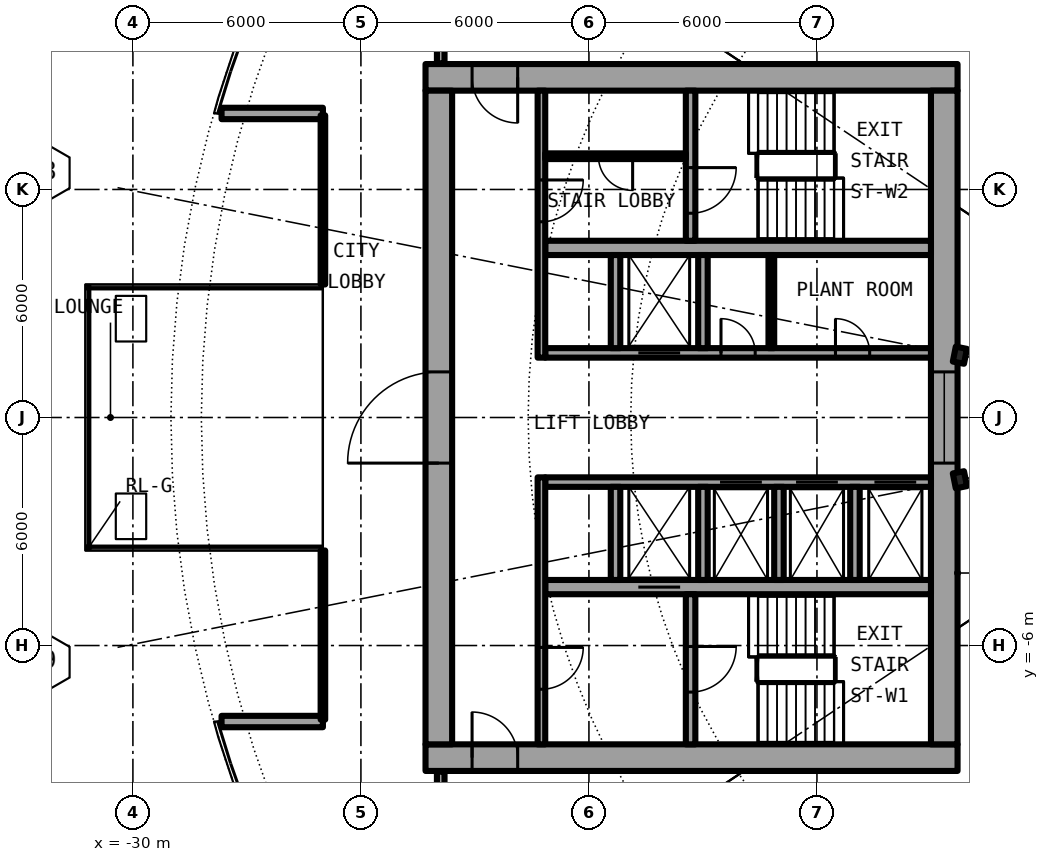
"""IFC4 building model, lengths in metres.
Left out: names, types, materials, properties, quantities, classifications, styles, units other than length and angle.
Written with IfcOpenShell. Run it as: python <this file> out.ifc"""

import sys

from ifc_helpers import new_model, si_unit, direction, frame, frame_2d, origin, origin_2d, place, context, subcontext, project, spatial, rectangle, i_section, extrude, element, fill, save


model = new_model("IFC4")
c1 = context("Model", 3, precision=1e-05, world=origin(), true_north=direction((0.0, 1.0)))
c2 = subcontext(c1, "Body", "Model", "MODEL_VIEW")
j1 = project(units=[si_unit("LENGTHUNIT", "METRE"), si_unit("PLANEANGLEUNIT", "RADIAN")], contexts=[c1])
p1 = place(None, origin())
s1 = spatial("IfcSite", under=j1, at=p1, CompositionType="ELEMENT")
p2 = place(p1, origin())
s2 = spatial("IfcBuilding", under=s1, at=p2, CompositionType="ELEMENT")
p3 = place(p2, frame((0.0, 0.0, 97.15)))
s3 = spatial("IfcBuildingStorey", under=s2, at=p3, CompositionType="ELEMENT", Elevation=97.15)
for number, where, z_axis, x_axis in (
    (1, (-8.239, 1.639, 0.0), (0.0, 0.0, 1.0), (-0.981, 0.195, 0.0)),
    (2, (-8.239, -1.639, 0.0), (0.0, 0.0, 1.0), (-0.981, -0.195, 0.0)),
):
    element("IfcColumn", number, at=place(p3, frame(where, z_axis=z_axis, x_axis=x_axis)), inside=s3, PredefinedType="COLUMN", context=c2, shape_type="SweptSolid", body=[
        extrude(i_section(OverallWidth=0.3, OverallDepth=0.4, WebThickness=0.013, FlangeThickness=0.024, FilletRadius=0.027, at=origin_2d()), origin(), (0.0, 0.0, 1.0), 6.1),
    ])
for number, where, z_axis, x_axis in (
    (3, (-25.0, 8.0, 0.0), (0.0, 0.0, 1.0), (-1.0, 0.0, 0.0)),
    (4, (-25.0, -8.0, 0.0), (0.0, 0.0, 1.0), (-1.0, 0.0, 0.0)),
):
    element("IfcWall", number, at=place(p3, frame(where, z_axis=z_axis, x_axis=x_axis)), inside=s3, PredefinedType="SOLIDWALL", context=c2, shape_type="SweptSolid", body=[
        extrude(rectangle(XDim=2.667, YDim=0.3, at=frame_2d((1.333, 0.0))), origin(), (0.0, 0.0, 1.0), 5.7),
    ])
p4 = place(p3, frame((-22.3, -8.95, 0.0), z_axis=(0.0, 0.0, 1.0), x_axis=(1.0, 0.0, 0.0)))
e5 = element("IfcWall", 5, at=p4, inside=s3, PredefinedType="SHEAR", context=c2, shape_type="SweptSolid", body=[
    extrude(rectangle(XDim=14.0, YDim=0.7, at=frame_2d((7.0, 0.0))), origin(), (0.0, 0.0, 1.0), 6.1),
])
p5 = place(p4, frame((1.225, 0.0, 0.0)))
e6 = element("IfcOpeningElement", 6, at=p5, cuts=e5, PredefinedType="OPENING", context=c2, shape_type="SweptSolid", body=[
    extrude(rectangle(XDim=1.2, YDim=2.3, at=frame_2d((0.6, 1.15))), frame((0.0, 0.36, 0.0), z_axis=(0.0, -1.0, 0.0), x_axis=(1.0, 0.0, 0.0)), (0.0, 0.0, 1.0), 0.72),
])
p6 = place(p3, frame((-8.3, 8.95, 0.0), z_axis=(0.0, 0.0, 1.0), x_axis=(-1.0, 0.0, 0.0)))
e7 = element("IfcWall", 7, at=p6, inside=s3, PredefinedType="SHEAR", context=c2, shape_type="SweptSolid", body=[
    extrude(rectangle(XDim=14.0, YDim=0.7, at=frame_2d((7.0, 0.0))), origin(), (0.0, 0.0, 1.0), 6.1),
])
p7 = place(p6, frame((11.575, 0.0, 0.0)))
e8 = element("IfcOpeningElement", 8, at=p7, cuts=e7, PredefinedType="OPENING", context=c2, shape_type="SweptSolid", body=[
    extrude(rectangle(XDim=1.2, YDim=2.3, at=frame_2d((0.6, 1.15))), frame((0.0, 0.36, 0.0), z_axis=(0.0, -1.0, 0.0), x_axis=(1.0, 0.0, 0.0)), (0.0, 0.0, 1.0), 0.72),
])
p8 = place(p3, frame((-21.95, -8.6, 0.0), z_axis=(0.0, 0.0, 1.0), x_axis=(0.0, 1.0, 0.0)))
e9 = element("IfcWall", 9, at=p8, inside=s3, PredefinedType="SHEAR", context=c2, shape_type="SweptSolid", body=[
    extrude(rectangle(XDim=17.2, YDim=0.7, at=frame_2d((8.6, 0.0))), origin(), (0.0, 0.0, 1.0), 6.1),
])
p9 = place(p8, frame((7.4, 0.0, 0.0)))
e10 = element("IfcOpeningElement", 10, at=p9, cuts=e9, PredefinedType="OPENING", context=c2, shape_type="SweptSolid", body=[
    extrude(rectangle(XDim=2.4, YDim=2.3, at=frame_2d((1.2, 1.15))), frame((0.0, 0.36, 0.0), z_axis=(0.0, -1.0, 0.0), x_axis=(1.0, 0.0, 0.0)), (0.0, 0.0, 1.0), 0.72),
])
p10 = place(p3, frame((-8.65, 8.6, 0.0), z_axis=(0.0, 0.0, 1.0), x_axis=(0.0, -1.0, 0.0)))
e11 = element("IfcWall", 11, at=p10, inside=s3, PredefinedType="SHEAR", context=c2, shape_type="SweptSolid", body=[
    extrude(rectangle(XDim=17.2, YDim=0.7, at=frame_2d((8.6, 0.0))), origin(), (0.0, 0.0, 1.0), 6.1),
])
p11 = place(p10, frame((7.4, 0.0, 0.1)))
e12 = element("IfcOpeningElement", 12, at=p11, cuts=e11, PredefinedType="OPENING", context=c2, shape_type="SweptSolid", body=[
    extrude(rectangle(XDim=2.4, YDim=2.2, at=frame_2d((1.2, 1.1))), frame((0.0, 0.36, 0.0), z_axis=(0.0, -1.0, 0.0), x_axis=(1.0, 0.0, 0.0)), (0.0, 0.0, 1.0), 0.72),
])
p12 = place(p3, frame((-9.0, -1.7, 0.0), z_axis=(0.0, 0.0, 1.0), x_axis=(-1.0, 0.0, 0.0)))
e13 = element("IfcWall", 13, at=p12, inside=s3, PredefinedType="SHEAR", context=c2, shape_type="SweptSolid", body=[
    extrude(rectangle(XDim=10.15, YDim=0.25, at=frame_2d((5.075, 0.0))), origin(), (0.0, 0.0, 1.0), 6.1),
])
p13 = place(p12, frame((0.387, 0.0, 0.0)))
e14 = element("IfcOpeningElement", 14, at=p13, cuts=e13, PredefinedType="OPENING", context=c2, shape_type="SweptSolid", body=[
    extrude(rectangle(XDim=1.1, YDim=2.3, at=frame_2d((0.55, 1.15))), frame((0.0, 0.135, 0.0), z_axis=(0.0, -1.0, 0.0), x_axis=(1.0, 0.0, 0.0)), (0.0, 0.0, 1.0), 0.27),
])
p14 = place(p12, frame((2.45, 0.0, 0.0)))
e15 = element("IfcOpeningElement", 15, at=p14, cuts=e13, PredefinedType="OPENING", context=c2, shape_type="SweptSolid", body=[
    extrude(rectangle(XDim=1.1, YDim=2.3, at=frame_2d((0.55, 1.15))), frame((0.0, 0.135, 0.0), z_axis=(0.0, -1.0, 0.0), x_axis=(1.0, 0.0, 0.0)), (0.0, 0.0, 1.0), 0.27),
])
p15 = place(p12, frame((4.45, 0.0, 0.0)))
e16 = element("IfcOpeningElement", 16, at=p15, cuts=e13, PredefinedType="OPENING", context=c2, shape_type="SweptSolid", body=[
    extrude(rectangle(XDim=1.1, YDim=2.3, at=frame_2d((0.55, 1.15))), frame((0.0, 0.135, 0.0), z_axis=(0.0, -1.0, 0.0), x_axis=(1.0, 0.0, 0.0)), (0.0, 0.0, 1.0), 0.27),
])
p16 = place(p3, frame((-9.0, -4.462, 0.0), z_axis=(0.0, 0.0, 1.0), x_axis=(-1.0, 0.0, 0.0)))
e17 = element("IfcWall", 17, at=p16, inside=s3, PredefinedType="SHEAR", context=c2, shape_type="SweptSolid", body=[
    extrude(rectangle(XDim=10.15, YDim=0.375, at=frame_2d((5.075, 0.0))), origin(), (0.0, 0.0, 1.0), 6.1),
])
p17 = place(p16, frame((6.6, 0.0, 0.0)))
e18 = element("IfcOpeningElement", 18, at=p17, cuts=e17, PredefinedType="OPENING", context=c2, shape_type="SweptSolid", body=[
    extrude(rectangle(XDim=1.1, YDim=2.3, at=frame_2d((0.55, 1.15))), frame((0.0, 0.198, 0.0), z_axis=(0.0, -1.0, 0.0), x_axis=(1.0, 0.0, 0.0)), (0.0, 0.0, 1.0), 0.395),
])
p18 = place(p3, frame((-15.325, -4.65, 0.0), z_axis=(0.0, 0.0, 1.0), x_axis=(0.0, -1.0, 0.0)))
e19 = element("IfcWall", 19, at=p18, inside=s3, PredefinedType="SHEAR", context=c2, shape_type="SweptSolid", body=[
    extrude(rectangle(XDim=3.95, YDim=0.25, at=frame_2d((1.975, 0.0))), origin(), (0.0, 0.0, 1.0), 6.1),
])
p19 = place(p18, frame((1.375, 0.0, 0.0)))
e20 = element("IfcOpeningElement", 20, at=p19, cuts=e19, PredefinedType="OPENING", context=c2, shape_type="SweptSolid", body=[
    extrude(rectangle(XDim=1.2, YDim=2.3, at=frame_2d((0.6, 1.15))), frame((0.0, 0.135, 0.0), z_axis=(0.0, -1.0, 0.0), x_axis=(1.0, 0.0, 0.0)), (0.0, 0.0, 1.0), 0.27),
])
for number, where, z_axis, x_axis in (
    (21, (-15.0, -1.825, 0.0), (0.0, 0.0, 1.0), (0.0, -1.0, 0.0)),
    (22, (-17.3, -1.825, 0.0), (0.0, 0.0, 1.0), (0.0, -1.0, 0.0)),
):
    element("IfcWall", number, at=place(p3, frame(where, z_axis=z_axis, x_axis=x_axis)), inside=s3, PredefinedType="SOLIDWALL", context=c2, shape_type="SweptSolid", body=[
        extrude(rectangle(XDim=2.45, YDim=0.25, at=frame_2d((1.225, 0.0))), origin(), (0.0, 0.0, 1.0), 5.7),
    ])
p20 = place(p3, frame((-19.25, -1.575, 0.0), z_axis=(0.0, 0.0, 1.0), x_axis=(0.0, -1.0, 0.0)))
e23 = element("IfcWall", 23, at=p20, inside=s3, PredefinedType="SOLIDWALL", context=c2, shape_type="SweptSolid", body=[
    extrude(rectangle(XDim=7.025, YDim=0.2, at=frame_2d((3.513, 0.0))), origin(), (0.0, 0.0, 1.0), 5.7),
])
p21 = place(p20, frame((4.475, 0.0, 0.0)))
e24 = element("IfcOpeningElement", 24, at=p21, cuts=e23, PredefinedType="OPENING", context=c2, shape_type="SweptSolid", body=[
    extrude(rectangle(XDim=1.1, YDim=2.3, at=frame_2d((0.55, 1.15))), frame((0.0, 0.11, 0.0), z_axis=(0.0, -1.0, 0.0), x_axis=(1.0, 0.0, 0.0)), (0.0, 0.0, 1.0), 0.22),
])
p22 = place(p3, frame((-19.15, 1.7, 0.0), z_axis=(0.0, 0.0, 1.0), x_axis=(1.0, 0.0, 0.0)))
e25 = element("IfcWall", 25, at=p22, inside=s3, PredefinedType="SHEAR", context=c2, shape_type="SweptSolid", body=[
    extrude(rectangle(XDim=10.15, YDim=0.25, at=frame_2d((5.075, 0.0))), origin(), (0.0, 0.0, 1.0), 6.1),
])
p23 = place(p22, frame((2.45, 0.0, 0.0)))
e26 = element("IfcOpeningElement", 26, at=p23, cuts=e25, PredefinedType="OPENING", context=c2, shape_type="SweptSolid", body=[
    extrude(rectangle(XDim=1.1, YDim=2.3, at=frame_2d((0.55, 1.15))), frame((0.0, 0.135, 0.0), z_axis=(0.0, -1.0, 0.0), x_axis=(1.0, 0.0, 0.0)), (0.0, 0.0, 1.0), 0.27),
])
p24 = place(p22, frame((7.637, 0.0, 0.0)))
e27 = element("IfcOpeningElement", 27, at=p24, cuts=e25, PredefinedType="OPENING", context=c2, shape_type="SweptSolid", body=[
    extrude(rectangle(XDim=0.9, YDim=2.3, at=frame_2d((0.45, 1.15))), frame((0.0, 0.135, 0.0), z_axis=(0.0, -1.0, 0.0), x_axis=(1.0, 0.0, 0.0)), (0.0, 0.0, 1.0), 0.27),
])
p25 = place(p22, frame((4.625, 0.0, 0.0)))
e28 = element("IfcOpeningElement", 28, at=p25, cuts=e25, PredefinedType="OPENING", context=c2, shape_type="SweptSolid", body=[
    extrude(rectangle(XDim=0.9, YDim=2.3, at=frame_2d((0.45, 1.15))), frame((0.0, 0.135, 0.0), z_axis=(0.0, -1.0, 0.0), x_axis=(1.0, 0.0, 0.0)), (0.0, 0.0, 1.0), 0.27),
])
p26 = place(p3, frame((-9.0, 4.462, 0.0), z_axis=(0.0, 0.0, 1.0), x_axis=(-1.0, 0.0, 0.0)))
e29 = element("IfcWall", 29, at=p26, inside=s3, PredefinedType="SHEAR", context=c2, shape_type="SweptSolid", body=[
    extrude(rectangle(XDim=10.15, YDim=0.375, at=frame_2d((5.075, 0.0))), origin(), (0.0, 0.0, 1.0), 6.1),
])
p27 = place(p3, frame((-15.325, 8.6, 0.0), z_axis=(0.0, 0.0, 1.0), x_axis=(0.0, -1.0, 0.0)))
e30 = element("IfcWall", 30, at=p27, inside=s3, PredefinedType="SHEAR", context=c2, shape_type="SweptSolid", body=[
    extrude(rectangle(XDim=3.95, YDim=0.25, at=frame_2d((1.975, 0.0))), origin(), (0.0, 0.0, 1.0), 6.1),
])
p28 = place(p27, frame((2.025, 0.0, 0.0)))
e31 = element("IfcOpeningElement", 31, at=p28, cuts=e30, PredefinedType="OPENING", context=c2, shape_type="SweptSolid", body=[
    extrude(rectangle(XDim=1.2, YDim=2.3, at=frame_2d((0.6, 1.15))), frame((0.0, 0.135, 0.0), z_axis=(0.0, -1.0, 0.0), x_axis=(1.0, 0.0, 0.0)), (0.0, 0.0, 1.0), 0.27),
])
for number, where, z_axis, x_axis in (
    (32, (-15.0, 1.825, 0.0), (0.0, 0.0, 1.0), (0.0, 1.0, 0.0)),
    (33, (-17.3, 1.825, 0.0), (0.0, 0.0, 1.0), (0.0, 1.0, 0.0)),
):
    element("IfcWall", number, at=place(p3, frame(where, z_axis=z_axis, x_axis=x_axis)), inside=s3, PredefinedType="SOLIDWALL", context=c2, shape_type="SweptSolid", body=[
        extrude(rectangle(XDim=2.45, YDim=0.25, at=frame_2d((1.225, 0.0))), origin(), (0.0, 0.0, 1.0), 5.7),
    ])
p29 = place(p3, frame((-19.25, 8.6, 0.0), z_axis=(0.0, 0.0, 1.0), x_axis=(0.0, -1.0, 0.0)))
e34 = element("IfcWall", 34, at=p29, inside=s3, PredefinedType="SOLIDWALL", context=c2, shape_type="SweptSolid", body=[
    extrude(rectangle(XDim=7.025, YDim=0.2, at=frame_2d((3.513, 0.0))), origin(), (0.0, 0.0, 1.0), 5.7),
])
p30 = place(p29, frame((2.35, 0.0, 0.0)))
e35 = element("IfcOpeningElement", 35, at=p30, cuts=e34, PredefinedType="OPENING", context=c2, shape_type="SweptSolid", body=[
    extrude(rectangle(XDim=1.1, YDim=2.3, at=frame_2d((0.55, 1.15))), frame((0.0, 0.11, 0.0), z_axis=(0.0, -1.0, 0.0), x_axis=(1.0, 0.0, 0.0)), (0.0, 0.0, 1.0), 0.22),
])
for number, where, z_axis, x_axis in (
    (36, (-11.0, -1.825, 0.0), (0.0, 0.0, 1.0), (0.0, -1.0, 0.0)),
    (37, (-13.0, -1.825, 0.0), (0.0, 0.0, 1.0), (0.0, -1.0, 0.0)),
):
    element("IfcWall", number, at=place(p3, frame(where, z_axis=z_axis, x_axis=x_axis)), inside=s3, PredefinedType="SOLIDWALL", context=c2, shape_type="SweptSolid", body=[
        extrude(rectangle(XDim=2.45, YDim=0.25, at=frame_2d((1.225, 0.0))), origin(), (0.0, 0.0, 1.0), 5.7),
    ])
p31 = place(p3, frame((-13.2, 1.825, 0.0), z_axis=(0.0, 0.0, 1.0), x_axis=(0.0, 1.0, 0.0)))
e38 = element("IfcWall", 38, at=p31, inside=s3, PredefinedType="PARTITIONING", context=c2, shape_type="SweptSolid", body=[
    extrude(rectangle(XDim=2.45, YDim=0.15, at=frame_2d((1.225, 0.0))), origin(), (0.0, 0.0, 1.0), 5.7),
])
p32 = place(p3, frame((-15.45, 6.875, 0.0), z_axis=(0.0, 0.0, 1.0), x_axis=(-1.0, 0.0, 0.0)))
e39 = element("IfcWall", 39, at=p32, inside=s3, PredefinedType="PARTITIONING", context=c2, shape_type="SweptSolid", body=[
    extrude(rectangle(XDim=3.7, YDim=0.15, at=frame_2d((1.85, 0.0))), origin(), (0.0, 0.0, 1.0), 5.7),
])
p33 = place(p32, frame((1.4, 0.0, 0.0)))
e40 = element("IfcOpeningElement", 40, at=p33, cuts=e39, PredefinedType="OPENING", context=c2, shape_type="SweptSolid", body=[
    extrude(rectangle(XDim=0.9, YDim=2.3, at=frame_2d((0.45, 1.15))), frame((0.0, 0.085, 0.0), z_axis=(0.0, -1.0, 0.0), x_axis=(1.0, 0.0, 0.0)), (0.0, 0.0, 1.0), 0.17),
])
p34 = place(p3, frame((-25.0, 3.5, 0.0), z_axis=(0.0, 0.0, 1.0), x_axis=(0.0, 1.0, 0.0)))
e41 = element("IfcWall", 41, at=p34, inside=s3, PredefinedType="PARTITIONING", context=c2, shape_type="SweptSolid", body=[
    extrude(rectangle(XDim=4.45, YDim=0.12, at=frame_2d((2.225, 0.0))), origin(), (0.0, 0.0, 1.0), 5.7),
])
p35 = place(p34, frame((0.4, 0.0, 0.1)))
e42 = element("IfcOpeningElement", 42, at=p35, cuts=e41, PredefinedType="OPENING", context=c2, shape_type="SweptSolid", body=[
    extrude(rectangle(XDim=3.6, YDim=5.35, at=frame_2d((1.8, 2.675))), frame((0.0, 0.07, 0.0), z_axis=(0.0, -1.0, 0.0), x_axis=(1.0, 0.0, 0.0)), (0.0, 0.0, 1.0), 0.14),
])
p36 = place(p3, frame((-25.0, -3.5, 0.0), z_axis=(0.0, 0.0, 1.0), x_axis=(0.0, -1.0, 0.0)))
e43 = element("IfcWall", 43, at=p36, inside=s3, PredefinedType="PARTITIONING", context=c2, shape_type="SweptSolid", body=[
    extrude(rectangle(XDim=4.45, YDim=0.12, at=frame_2d((2.225, 0.0))), origin(), (0.0, 0.0, 1.0), 5.7),
])
p37 = place(p36, frame((0.4, 0.0, 0.1)))
e44 = element("IfcOpeningElement", 44, at=p37, cuts=e43, PredefinedType="OPENING", context=c2, shape_type="SweptSolid", body=[
    extrude(rectangle(XDim=3.6, YDim=5.35, at=frame_2d((1.8, 2.675))), frame((0.0, 0.07, 0.0), z_axis=(0.0, -1.0, 0.0), x_axis=(1.0, 0.0, 0.0)), (0.0, 0.0, 1.0), 0.14),
])
p38 = place(p3, frame((-10.393, 25.091, 0.0), z_axis=(0.0, 0.0, 1.0), x_axis=(0.382668905709, -0.923885549516, 0.0)))
e45 = element("IfcWall", 45, at=p38, inside=s3, PredefinedType="PARTITIONING", context=c2, shape_type="SweptSolid", body=[
    extrude(rectangle(XDim=17.339, YDim=0.15, at=frame_2d((8.669, 0.0))), origin(), (0.0, 0.0, 1.0), 5.7),
])
for number, where, z_axis, x_axis in (
    (46, (-21.9, -12.72, 0.0), (0.0, 0.0, 1.0), (0.0, 1.0, 0.0)),
    (47, (-21.9, 9.32, 0.0), (0.0, 0.0, 1.0), (0.0, 1.0, 0.0)),
):
    element("IfcWall", number, at=place(p3, frame(where, z_axis=z_axis, x_axis=x_axis)), inside=s3, PredefinedType="PARTITIONING", context=c2, shape_type="SweptSolid", body=[
        extrude(rectangle(XDim=3.4, YDim=0.2, at=frame_2d((1.7, 0.0))), origin(), (0.0, 0.0, 1.0), 5.7),
    ])
p39 = place(p13, origin())
e48 = element("IfcDoor", 48, at=p39, inside=s3, OperationType="DOUBLE_DOOR_SLIDING", PredefinedType="DOOR", context=c2, shape_type="SweptSolid", body=[
    extrude(rectangle(XDim=1.1, YDim=2.3, at=frame_2d((0.55, 1.15))), frame((0.0, 0.025, 0.0), z_axis=(0.0, -1.0, 0.0), x_axis=(1.0, 0.0, 0.0)), (0.0, 0.0, 1.0), 0.05),
])
fill(e14, e48)
p40 = place(p14, origin())
e49 = element("IfcDoor", 49, at=p40, inside=s3, OperationType="DOUBLE_DOOR_SLIDING", PredefinedType="DOOR", context=c2, shape_type="SweptSolid", body=[
    extrude(rectangle(XDim=1.1, YDim=2.3, at=frame_2d((0.55, 1.15))), frame((0.0, 0.025, 0.0), z_axis=(0.0, -1.0, 0.0), x_axis=(1.0, 0.0, 0.0)), (0.0, 0.0, 1.0), 0.05),
])
fill(e15, e49)
p41 = place(p15, origin())
e50 = element("IfcDoor", 50, at=p41, inside=s3, OperationType="DOUBLE_DOOR_SLIDING", PredefinedType="DOOR", context=c2, shape_type="SweptSolid", body=[
    extrude(rectangle(XDim=1.1, YDim=2.3, at=frame_2d((0.55, 1.15))), frame((0.0, 0.025, 0.0), z_axis=(0.0, -1.0, 0.0), x_axis=(1.0, 0.0, 0.0)), (0.0, 0.0, 1.0), 0.05),
])
fill(e16, e50)
p42 = place(p17, origin())
e51 = element("IfcDoor", 51, at=p42, inside=s3, OperationType="DOUBLE_DOOR_SLIDING", PredefinedType="DOOR", context=c2, shape_type="SweptSolid", body=[
    extrude(rectangle(XDim=1.1, YDim=2.3, at=frame_2d((0.55, 1.15))), frame((0.0, 0.025, 0.0), z_axis=(0.0, -1.0, 0.0), x_axis=(1.0, 0.0, 0.0)), (0.0, 0.0, 1.0), 0.05),
])
fill(e18, e51)
p43 = place(p23, origin())
e52 = element("IfcDoor", 52, at=p43, inside=s3, OperationType="DOUBLE_DOOR_SLIDING", PredefinedType="DOOR", context=c2, shape_type="SweptSolid", body=[
    extrude(rectangle(XDim=1.1, YDim=2.3, at=frame_2d((0.55, 1.15))), frame((0.0, 0.025, 0.0), z_axis=(0.0, -1.0, 0.0), x_axis=(1.0, 0.0, 0.0)), (0.0, 0.0, 1.0), 0.05),
])
fill(e26, e52)
p44 = place(p24, origin())
e53 = element("IfcDoor", 53, at=p44, inside=s3, OperationType="SINGLE_SWING_LEFT", PredefinedType="DOOR", context=c2, shape_type="SweptSolid", body=[
    extrude(rectangle(XDim=0.9, YDim=2.3, at=frame_2d((0.45, 1.15))), frame((0.0, 0.025, 0.0), z_axis=(0.0, -1.0, 0.0), x_axis=(1.0, 0.0, 0.0)), (0.0, 0.0, 1.0), 0.05),
])
fill(e27, e53)
p45 = place(p25, origin())
e54 = element("IfcDoor", 54, at=p45, inside=s3, OperationType="SINGLE_SWING_LEFT", PredefinedType="DOOR", context=c2, shape_type="SweptSolid", body=[
    extrude(rectangle(XDim=0.9, YDim=2.3, at=frame_2d((0.45, 1.15))), frame((0.0, 0.025, 0.0), z_axis=(0.0, -1.0, 0.0), x_axis=(1.0, 0.0, 0.0)), (0.0, 0.0, 1.0), 0.05),
])
fill(e28, e54)
p46 = place(p33, origin())
e55 = element("IfcDoor", 55, at=p46, inside=s3, OperationType="SINGLE_SWING_LEFT", PredefinedType="DOOR", context=c2, shape_type="SweptSolid", body=[
    extrude(rectangle(XDim=0.9, YDim=2.3, at=frame_2d((0.45, 1.15))), frame((0.0, 0.025, 0.0), z_axis=(0.0, -1.0, 0.0), x_axis=(1.0, 0.0, 0.0)), (0.0, 0.0, 1.0), 0.05),
])
fill(e40, e55)
p47 = place(p19, origin())
e56 = element("IfcDoor", 56, at=p47, inside=s3, OperationType="SINGLE_SWING_LEFT", PredefinedType="DOOR", context=c2, shape_type="SweptSolid", body=[
    extrude(rectangle(XDim=1.2, YDim=2.3, at=frame_2d((0.6, 1.15))), frame((0.0, 0.025, 0.0), z_axis=(0.0, -1.0, 0.0), x_axis=(1.0, 0.0, 0.0)), (0.0, 0.0, 1.0), 0.05),
])
fill(e20, e56)
p48 = place(p28, origin())
e57 = element("IfcDoor", 57, at=p48, inside=s3, OperationType="SINGLE_SWING_LEFT", PredefinedType="DOOR", context=c2, shape_type="SweptSolid", body=[
    extrude(rectangle(XDim=1.2, YDim=2.3, at=frame_2d((0.6, 1.15))), frame((0.0, 0.025, 0.0), z_axis=(0.0, -1.0, 0.0), x_axis=(1.0, 0.0, 0.0)), (0.0, 0.0, 1.0), 0.05),
])
fill(e31, e57)
p49 = place(p21, origin())
e58 = element("IfcDoor", 58, at=p49, inside=s3, OperationType="SINGLE_SWING_LEFT", PredefinedType="DOOR", context=c2, shape_type="SweptSolid", body=[
    extrude(rectangle(XDim=1.1, YDim=2.3, at=frame_2d((0.55, 1.15))), frame((0.0, 0.025, 0.0), z_axis=(0.0, -1.0, 0.0), x_axis=(1.0, 0.0, 0.0)), (0.0, 0.0, 1.0), 0.05),
])
fill(e24, e58)
p50 = place(p30, origin())
e59 = element("IfcDoor", 59, at=p50, inside=s3, OperationType="SINGLE_SWING_RIGHT", PredefinedType="DOOR", context=c2, shape_type="SweptSolid", body=[
    extrude(rectangle(XDim=1.1, YDim=2.3, at=frame_2d((0.55, 1.15))), frame((0.0, 0.025, 0.0), z_axis=(0.0, -1.0, 0.0), x_axis=(1.0, 0.0, 0.0)), (0.0, 0.0, 1.0), 0.05),
])
fill(e35, e59)
p51 = place(p5, origin())
e60 = element("IfcDoor", 60, at=p51, inside=s3, OperationType="SINGLE_SWING_RIGHT", PredefinedType="DOOR", context=c2, shape_type="SweptSolid", body=[
    extrude(rectangle(XDim=1.2, YDim=2.3, at=frame_2d((0.6, 1.15))), frame((0.0, 0.025, 0.0), z_axis=(0.0, -1.0, 0.0), x_axis=(1.0, 0.0, 0.0)), (0.0, 0.0, 1.0), 0.05),
])
fill(e6, e60)
p52 = place(p7, origin())
e61 = element("IfcDoor", 61, at=p52, inside=s3, OperationType="SINGLE_SWING_LEFT", PredefinedType="DOOR", context=c2, shape_type="SweptSolid", body=[
    extrude(rectangle(XDim=1.2, YDim=2.3, at=frame_2d((0.6, 1.15))), frame((0.0, 0.025, 0.0), z_axis=(0.0, -1.0, 0.0), x_axis=(1.0, 0.0, 0.0)), (0.0, 0.0, 1.0), 0.05),
])
fill(e8, e61)
p53 = place(p9, origin())
e62 = element("IfcDoor", 62, at=p53, inside=s3, OperationType="SINGLE_SWING_LEFT", PredefinedType="DOOR", context=c2, shape_type="SweptSolid", body=[
    extrude(rectangle(XDim=2.4, YDim=2.3, at=frame_2d((1.2, 1.15))), frame((0.0, 0.025, 0.0), z_axis=(0.0, -1.0, 0.0), x_axis=(1.0, 0.0, 0.0)), (0.0, 0.0, 1.0), 0.05),
])
fill(e10, e62)
p54 = place(p11, origin())
e63 = element("IfcWindow", 63, at=p54, inside=s3, PartitioningType="SINGLE_PANEL", PredefinedType="WINDOW", context=c2, shape_type="SweptSolid", body=[
    extrude(rectangle(XDim=2.4, YDim=2.2, at=frame_2d((1.2, 1.1))), frame((0.0, 0.03, 0.0), z_axis=(0.0, -1.0, 0.0), x_axis=(1.0, 0.0, 0.0)), (0.0, 0.0, 1.0), 0.06),
])
fill(e12, e63)
p55 = place(p35, origin())
e64 = element("IfcWindow", 64, at=p55, inside=s3, PartitioningType="SINGLE_PANEL", PredefinedType="WINDOW", context=c2, shape_type="SweptSolid", body=[
    extrude(rectangle(XDim=3.6, YDim=5.35, at=frame_2d((1.8, 2.675))), frame((0.0, 0.03, 0.0), z_axis=(0.0, -1.0, 0.0), x_axis=(1.0, 0.0, 0.0)), (0.0, 0.0, 1.0), 0.06),
])
fill(e42, e64)
p56 = place(p37, origin())
e65 = element("IfcWindow", 65, at=p56, inside=s3, PartitioningType="SINGLE_PANEL", PredefinedType="WINDOW", context=c2, shape_type="SweptSolid", body=[
    extrude(rectangle(XDim=3.6, YDim=5.35, at=frame_2d((1.8, 2.675))), frame((0.0, 0.03, 0.0), z_axis=(0.0, -1.0, 0.0), x_axis=(1.0, 0.0, 0.0)), (0.0, 0.0, 1.0), 0.06),
])
fill(e44, e65)
save(model, sys.argv[1])
